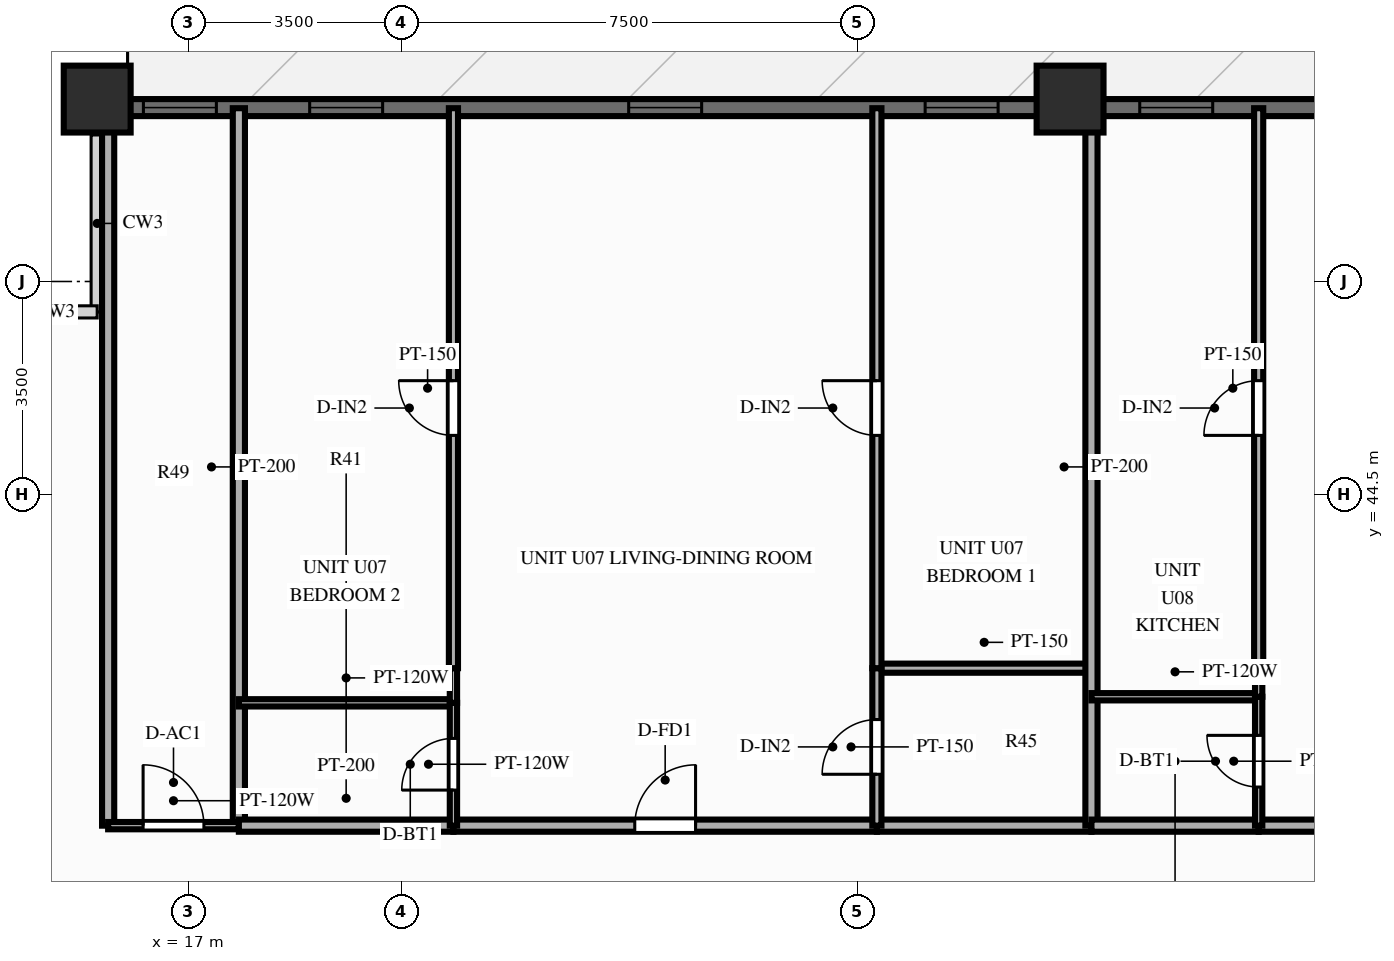
"""IFC4 building model, lengths in metres.
Left out: names, types, materials, properties, quantities, classifications, styles, units other than length and angle.
Written with IfcOpenShell. Run it as: python <this file> out.ifc"""

import sys

from ifc_helpers import new_model, si_unit, direction, frame, frame_2d, origin, origin_2d, place, context, subcontext, project, spatial, rectangle, extrude, source, transform, mapped, element, fill, save


model = new_model("IFC4")
c1 = context("Model", 3, precision=1e-05, world=origin(), true_north=direction((0.0, 1.0)))
c2 = subcontext(c1, "Body", "Model", "MODEL_VIEW")
j1 = project(units=[si_unit("LENGTHUNIT", "METRE"), si_unit("PLANEANGLEUNIT", "RADIAN")], contexts=[c1])
p1 = place(None, origin())
s1 = spatial("IfcSite", under=j1, at=p1, CompositionType="ELEMENT")
p2 = place(p1, origin())
s2 = spatial("IfcBuilding", under=s1, at=p2, CompositionType="ELEMENT")
p3 = place(p2, frame((0.0, 0.0, 25.4)))
s3 = spatial("IfcBuildingStorey", under=s2, at=p3, CompositionType="ELEMENT", Elevation=25.4)
m1 = source(origin(), c2, "Body", "SweptSolid", [
    extrude(rectangle(XDim=1.1, YDim=1.1, at=origin_2d()), origin(), (0.0, 0.0, 1.0), 3.0),
])
for number, where, z_axis, x_axis in (
    (1, (31.5, 51.0, 0.0), (0.0, 0.0, 1.0), (1.0, 0.0, 0.0)),
    (2, (15.5, 51.0, 0.0), (0.0, 0.0, 1.0), (1.0, 0.0, 0.0)),
):
    element("IfcColumn", number, at=place(p3, frame(where, z_axis=z_axis, x_axis=x_axis)), inside=s3, PredefinedType="COLUMN", context=c2, shape_type="MappedRepresentation", body=[
        mapped(m1, transform((0.0, 0.0, 0.0), scale=1.0)),
    ])
p4 = place(p3, frame((15.5, 50.86, 0.0), z_axis=(0.0, 0.0, 1.0), x_axis=(1.0, 0.0, 0.0)))
e3 = element("IfcWall", 3, at=p4, inside=s3, PredefinedType="SOLIDWALL", context=c2, shape_type="SweptSolid", body=[
    extrude(rectangle(XDim=45.0, YDim=0.28, at=frame_2d((22.5, 0.0))), origin(), (0.0, 0.0, 1.0), 2.28),
])
p5 = place(p4, frame((0.76, 0.0, 0.25)))
e4 = element("IfcOpeningElement", 4, at=p5, cuts=e3, PredefinedType="OPENING", context=c2, shape_type="SweptSolid", body=[
    extrude(rectangle(XDim=1.2, YDim=1.5, at=frame_2d((0.6, 0.75))), frame((0.0, 0.152, 0.0), z_axis=(0.0, -1.0, 0.0), x_axis=(1.0, 0.0, 0.0)), (0.0, 0.0, 1.0), 0.304),
])
p6 = place(p4, frame((3.494, 0.0, 0.25)))
e5 = element("IfcOpeningElement", 5, at=p6, cuts=e3, PredefinedType="OPENING", context=c2, shape_type="SweptSolid", body=[
    extrude(rectangle(XDim=1.2, YDim=1.5, at=frame_2d((0.6, 0.75))), frame((0.0, 0.152, 0.0), z_axis=(0.0, -1.0, 0.0), x_axis=(1.0, 0.0, 0.0)), (0.0, 0.0, 1.0), 0.304),
])
p7 = place(p4, frame((8.741, 0.0, 0.25)))
e6 = element("IfcOpeningElement", 6, at=p7, cuts=e3, PredefinedType="OPENING", context=c2, shape_type="SweptSolid", body=[
    extrude(rectangle(XDim=1.2, YDim=1.5, at=frame_2d((0.6, 0.75))), frame((0.0, 0.152, 0.0), z_axis=(0.0, -1.0, 0.0), x_axis=(1.0, 0.0, 0.0)), (0.0, 0.0, 1.0), 0.304),
])
p8 = place(p4, frame((13.616, 0.0, 0.25)))
e7 = element("IfcOpeningElement", 7, at=p8, cuts=e3, PredefinedType="OPENING", context=c2, shape_type="SweptSolid", body=[
    extrude(rectangle(XDim=1.2, YDim=1.5, at=frame_2d((0.6, 0.75))), frame((0.0, 0.152, 0.0), z_axis=(0.0, -1.0, 0.0), x_axis=(1.0, 0.0, 0.0)), (0.0, 0.0, 1.0), 0.304),
])
p9 = place(p4, frame((17.146, 0.0, 0.25)))
e8 = element("IfcOpeningElement", 8, at=p9, cuts=e3, PredefinedType="OPENING", context=c2, shape_type="SweptSolid", body=[
    extrude(rectangle(XDim=1.2, YDim=1.5, at=frame_2d((0.6, 0.75))), frame((0.0, 0.152, 0.0), z_axis=(0.0, -1.0, 0.0), x_axis=(1.0, 0.0, 0.0)), (0.0, 0.0, 1.0), 0.304),
])
p10 = place(p4, frame((22.423, 0.0, 0.0)))
e9 = element("IfcOpeningElement", 9, at=p10, cuts=e3, PredefinedType="OPENING", context=c2, shape_type="SweptSolid", body=[
    extrude(rectangle(XDim=1.1, YDim=2.15, at=frame_2d((0.55, 1.075))), frame((0.0, 0.152, 0.0), z_axis=(0.0, -1.0, 0.0), x_axis=(1.0, 0.0, 0.0)), (0.0, 0.0, 1.0), 0.304),
])
p11 = place(p4, frame((27.252, 0.0, 0.25)))
e10 = element("IfcOpeningElement", 10, at=p11, cuts=e3, PredefinedType="OPENING", context=c2, shape_type="SweptSolid", body=[
    extrude(rectangle(XDim=0.95, YDim=1.5, at=frame_2d((0.475, 0.75))), frame((0.0, 0.152, 0.0), z_axis=(0.0, -1.0, 0.0), x_axis=(1.0, 0.0, 0.0)), (0.0, 0.0, 1.0), 0.304),
])
p12 = place(p4, frame((30.873, 0.0, 0.25)))
e11 = element("IfcOpeningElement", 11, at=p12, cuts=e3, PredefinedType="OPENING", context=c2, shape_type="SweptSolid", body=[
    extrude(rectangle(XDim=1.2, YDim=1.5, at=frame_2d((0.6, 0.75))), frame((0.0, 0.152, 0.0), z_axis=(0.0, -1.0, 0.0), x_axis=(1.0, 0.0, 0.0)), (0.0, 0.0, 1.0), 0.304),
])
p13 = place(p4, frame((33.113, 0.0, 0.25)))
e12 = element("IfcOpeningElement", 12, at=p13, cuts=e3, PredefinedType="OPENING", context=c2, shape_type="SweptSolid", body=[
    extrude(rectangle(XDim=1.2, YDim=1.5, at=frame_2d((0.6, 0.75))), frame((0.0, 0.152, 0.0), z_axis=(0.0, -1.0, 0.0), x_axis=(1.0, 0.0, 0.0)), (0.0, 0.0, 1.0), 0.304),
])
p14 = place(p4, frame((35.624, 0.0, 0.25)))
e13 = element("IfcOpeningElement", 13, at=p14, cuts=e3, PredefinedType="OPENING", context=c2, shape_type="SweptSolid", body=[
    extrude(rectangle(XDim=1.2, YDim=1.5, at=frame_2d((0.6, 0.75))), frame((0.0, 0.152, 0.0), z_axis=(0.0, -1.0, 0.0), x_axis=(1.0, 0.0, 0.0)), (0.0, 0.0, 1.0), 0.304),
])
p15 = place(p4, frame((38.097, 0.0, 0.25)))
e14 = element("IfcOpeningElement", 14, at=p15, cuts=e3, PredefinedType="OPENING", context=c2, shape_type="SweptSolid", body=[
    extrude(rectangle(XDim=1.2, YDim=1.5, at=frame_2d((0.6, 0.75))), frame((0.0, 0.152, 0.0), z_axis=(0.0, -1.0, 0.0), x_axis=(1.0, 0.0, 0.0)), (0.0, 0.0, 1.0), 0.304),
])
p16 = place(p4, frame((40.336, 0.0, 0.25)))
e15 = element("IfcOpeningElement", 15, at=p16, cuts=e3, PredefinedType="OPENING", context=c2, shape_type="SweptSolid", body=[
    extrude(rectangle(XDim=1.2, YDim=1.5, at=frame_2d((0.6, 0.75))), frame((0.0, 0.152, 0.0), z_axis=(0.0, -1.0, 0.0), x_axis=(1.0, 0.0, 0.0)), (0.0, 0.0, 1.0), 0.304),
])
p17 = place(p4, frame((42.743, 0.0, 0.25)))
e16 = element("IfcOpeningElement", 16, at=p17, cuts=e3, PredefinedType="OPENING", context=c2, shape_type="SweptSolid", body=[
    extrude(rectangle(XDim=1.2, YDim=1.5, at=frame_2d((0.6, 0.75))), frame((0.0, 0.152, 0.0), z_axis=(0.0, -1.0, 0.0), x_axis=(1.0, 0.0, 0.0)), (0.0, 0.0, 1.0), 0.304),
])
for number, where, z_axis, x_axis in (
    (17, (15.68, 39.05, 0.0), (0.0, 0.0, 1.0), (0.0, 1.0, 0.0)),
    (18, (17.83, 39.05, 0.0), (0.0, 0.0, 1.0), (0.0, 1.0, 0.0)),
):
    element("IfcWall", number, at=place(p3, frame(where, z_axis=z_axis, x_axis=x_axis)), inside=s3, PredefinedType="PARTITIONING", context=c2, shape_type="SweptSolid", body=[
        extrude(rectangle(XDim=11.8, YDim=0.2, at=frame_2d((5.9, 0.0))), origin(), (0.0, 0.0, 1.0), 2.79),
    ])
p18 = place(p3, frame((15.68, 39.05, 0.0), z_axis=(0.0, 0.0, 1.0), x_axis=(1.0, 0.0, 0.0)))
e19 = element("IfcWall", 19, at=p18, inside=s3, PredefinedType="PARTITIONING", context=c2, shape_type="SweptSolid", body=[
    extrude(rectangle(XDim=2.15, YDim=0.12, at=frame_2d((1.075, 0.0))), origin(), (0.0, 0.0, 1.0), 2.79),
])
p19 = place(p18, frame((0.575, 0.0, 0.0)))
e20 = element("IfcOpeningElement", 20, at=p19, cuts=e19, PredefinedType="OPENING", context=c2, shape_type="SweptSolid", body=[
    extrude(rectangle(XDim=1.0, YDim=2.1, at=frame_2d((0.5, 1.05))), frame((0.0, 0.072, 0.0), z_axis=(0.0, -1.0, 0.0), x_axis=(1.0, 0.0, 0.0)), (0.0, 0.0, 1.0), 0.144),
])
p20 = place(p3, frame((17.83, 39.05, 0.0), z_axis=(0.0, 0.0, 1.0), x_axis=(1.0, 0.0, 0.0)))
e21 = element("IfcWall", 21, at=p20, inside=s3, PredefinedType="PARTITIONING", context=c2, shape_type="SweptSolid", body=[
    extrude(rectangle(XDim=3.529, YDim=0.2, at=frame_2d((1.764, 0.0))), origin(), (0.0, 0.0, 1.0), 2.79),
])
p21 = place(p3, frame((21.359, 39.05, 0.0), z_axis=(0.0, 0.0, 1.0), x_axis=(1.0, 0.0, 0.0)))
e22 = element("IfcWall", 22, at=p21, inside=s3, PredefinedType="PARTITIONING", context=c2, shape_type="SweptSolid", body=[
    extrude(rectangle(XDim=6.964, YDim=0.2, at=frame_2d((3.482, 0.0))), origin(), (0.0, 0.0, 1.0), 2.79),
])
p22 = place(p21, frame((2.982, 0.0, 0.0)))
e23 = element("IfcOpeningElement", 23, at=p22, cuts=e22, PredefinedType="OPENING", context=c2, shape_type="SweptSolid", body=[
    extrude(rectangle(XDim=1.0, YDim=2.15, at=frame_2d((0.5, 1.075))), frame((0.0, 0.112, 0.0), z_axis=(0.0, -1.0, 0.0), x_axis=(1.0, 0.0, 0.0)), (0.0, 0.0, 1.0), 0.224),
])
p23 = place(p3, frame((28.323, 39.05, 0.0), z_axis=(0.0, 0.0, 1.0), x_axis=(1.0, 0.0, 0.0)))
e24 = element("IfcWall", 24, at=p23, inside=s3, PredefinedType="PARTITIONING", context=c2, shape_type="SweptSolid", body=[
    extrude(rectangle(XDim=3.529, YDim=0.2, at=frame_2d((1.764, 0.0))), origin(), (0.0, 0.0, 1.0), 2.79),
])
p24 = place(p3, frame((17.83, 41.07, 0.0), z_axis=(0.0, 0.0, 1.0), x_axis=(1.0, 0.0, 0.0)))
e25 = element("IfcWall", 25, at=p24, inside=s3, PredefinedType="PARTITIONING", context=c2, shape_type="SweptSolid", body=[
    extrude(rectangle(XDim=3.529, YDim=0.12, at=frame_2d((1.764, 0.0))), origin(), (0.0, 0.0, 1.0), 2.79),
])
p25 = place(p3, frame((28.323, 41.64, 0.0), z_axis=(0.0, 0.0, 1.0), x_axis=(1.0, 0.0, 0.0)))
e26 = element("IfcWall", 26, at=p25, inside=s3, PredefinedType="PARTITIONING", context=c2, shape_type="SweptSolid", body=[
    extrude(rectangle(XDim=3.529, YDim=0.15, at=frame_2d((1.764, 0.0))), origin(), (0.0, 0.0, 1.0), 2.79),
])
p26 = place(p3, frame((21.359, 39.05, 0.0), z_axis=(0.0, 0.0, 1.0), x_axis=(0.0, 1.0, 0.0)))
e27 = element("IfcWall", 27, at=p26, inside=s3, PredefinedType="PARTITIONING", context=c2, shape_type="SweptSolid", body=[
    extrude(rectangle(XDim=2.02, YDim=0.12, at=frame_2d((1.01, 0.0))), origin(), (0.0, 0.0, 1.0), 2.79),
])
p27 = place(p26, frame((0.585, 0.0, 0.0)))
e28 = element("IfcOpeningElement", 28, at=p27, cuts=e27, PredefinedType="OPENING", context=c2, shape_type="SweptSolid", body=[
    extrude(rectangle(XDim=0.85, YDim=2.05, at=frame_2d((0.425, 1.025))), frame((0.0, 0.072, 0.0), z_axis=(0.0, -1.0, 0.0), x_axis=(1.0, 0.0, 0.0)), (0.0, 0.0, 1.0), 0.144),
])
p28 = place(p3, frame((21.359, 41.07, 0.0), z_axis=(0.0, 0.0, 1.0), x_axis=(0.0, 1.0, 0.0)))
e29 = element("IfcWall", 29, at=p28, inside=s3, PredefinedType="PARTITIONING", context=c2, shape_type="SweptSolid", body=[
    extrude(rectangle(XDim=0.57, YDim=0.12, at=frame_2d((0.285, 0.0))), origin(), (0.0, 0.0, 1.0), 2.79),
])
p29 = place(p3, frame((21.359, 41.64, 0.0), z_axis=(0.0, 0.0, 1.0), x_axis=(0.0, 1.0, 0.0)))
e30 = element("IfcWall", 30, at=p29, inside=s3, PredefinedType="PARTITIONING", context=c2, shape_type="SweptSolid", body=[
    extrude(rectangle(XDim=9.21, YDim=0.15, at=frame_2d((4.605, 0.0))), origin(), (0.0, 0.0, 1.0), 2.79),
])
p30 = place(p29, frame((3.829, 0.0, 0.0)))
e31 = element("IfcOpeningElement", 31, at=p30, cuts=e30, PredefinedType="OPENING", context=c2, shape_type="SweptSolid", body=[
    extrude(rectangle(XDim=0.9, YDim=2.1, at=frame_2d((0.45, 1.05))), frame((0.0, 0.087, 0.0), z_axis=(0.0, -1.0, 0.0), x_axis=(1.0, 0.0, 0.0)), (0.0, 0.0, 1.0), 0.174),
])
p31 = place(p3, frame((28.323, 39.05, 0.0), z_axis=(0.0, 0.0, 1.0), x_axis=(0.0, 1.0, 0.0)))
e32 = element("IfcWall", 32, at=p31, inside=s3, PredefinedType="PARTITIONING", context=c2, shape_type="SweptSolid", body=[
    extrude(rectangle(XDim=2.59, YDim=0.15, at=frame_2d((1.295, 0.0))), origin(), (0.0, 0.0, 1.0), 2.79),
])
p32 = place(p31, frame((0.845, 0.0, 0.0)))
e33 = element("IfcOpeningElement", 33, at=p32, cuts=e32, PredefinedType="OPENING", context=c2, shape_type="SweptSolid", body=[
    extrude(rectangle(XDim=0.9, YDim=2.1, at=frame_2d((0.45, 1.05))), frame((0.0, 0.087, 0.0), z_axis=(0.0, -1.0, 0.0), x_axis=(1.0, 0.0, 0.0)), (0.0, 0.0, 1.0), 0.174),
])
p33 = place(p3, frame((28.323, 41.64, 0.0), z_axis=(0.0, 0.0, 1.0), x_axis=(0.0, 1.0, 0.0)))
e34 = element("IfcWall", 34, at=p33, inside=s3, PredefinedType="PARTITIONING", context=c2, shape_type="SweptSolid", body=[
    extrude(rectangle(XDim=9.21, YDim=0.15, at=frame_2d((4.605, 0.0))), origin(), (0.0, 0.0, 1.0), 2.79),
])
p34 = place(p33, frame((3.829, 0.0, 0.0)))
e35 = element("IfcOpeningElement", 35, at=p34, cuts=e34, PredefinedType="OPENING", context=c2, shape_type="SweptSolid", body=[
    extrude(rectangle(XDim=0.9, YDim=2.1, at=frame_2d((0.45, 1.05))), frame((0.0, 0.087, 0.0), z_axis=(0.0, -1.0, 0.0), x_axis=(1.0, 0.0, 0.0)), (0.0, 0.0, 1.0), 0.174),
])
p35 = place(p3, frame((31.852, 39.05, 0.0), z_axis=(0.0, 0.0, 1.0), x_axis=(0.0, 1.0, 0.0)))
e36 = element("IfcWall", 36, at=p35, inside=s3, PredefinedType="PARTITIONING", context=c2, shape_type="SweptSolid", body=[
    extrude(rectangle(XDim=11.8, YDim=0.2, at=frame_2d((5.9, 0.0))), origin(), (0.0, 0.0, 1.0), 2.79),
])
p36 = place(p3, frame((31.852, 39.05, 0.0), z_axis=(0.0, 0.0, 1.0), x_axis=(1.0, 0.0, 0.0)))
e37 = element("IfcWall", 37, at=p36, inside=s3, PredefinedType="PARTITIONING", context=c2, shape_type="SweptSolid", body=[
    extrude(rectangle(XDim=2.75, YDim=0.2, at=frame_2d((1.375, 0.0))), origin(), (0.0, 0.0, 1.0), 2.79),
])
p37 = place(p3, frame((34.602, 39.05, 0.0), z_axis=(0.0, 0.0, 1.0), x_axis=(1.0, 0.0, 0.0)))
e38 = element("IfcWall", 38, at=p37, inside=s3, PredefinedType="PARTITIONING", context=c2, shape_type="SweptSolid", body=[
    extrude(rectangle(XDim=7.743, YDim=0.2, at=frame_2d((3.871, 0.0))), origin(), (0.0, 0.0, 1.0), 2.79),
])
p38 = place(p37, frame((3.371, 0.0, 0.0)))
e39 = element("IfcOpeningElement", 39, at=p38, cuts=e38, PredefinedType="OPENING", context=c2, shape_type="SweptSolid", body=[
    extrude(rectangle(XDim=1.0, YDim=2.15, at=frame_2d((0.5, 1.075))), frame((0.0, 0.112, 0.0), z_axis=(0.0, -1.0, 0.0), x_axis=(1.0, 0.0, 0.0)), (0.0, 0.0, 1.0), 0.224),
])
p39 = place(p3, frame((31.852, 41.17, 0.0), z_axis=(0.0, 0.0, 1.0), x_axis=(1.0, 0.0, 0.0)))
e40 = element("IfcWall", 40, at=p39, inside=s3, PredefinedType="PARTITIONING", context=c2, shape_type="SweptSolid", body=[
    extrude(rectangle(XDim=2.75, YDim=0.12, at=frame_2d((1.375, 0.0))), origin(), (0.0, 0.0, 1.0), 2.79),
])
p40 = place(p3, frame((34.602, 39.05, 0.0), z_axis=(0.0, 0.0, 1.0), x_axis=(0.0, 1.0, 0.0)))
e41 = element("IfcWall", 41, at=p40, inside=s3, PredefinedType="PARTITIONING", context=c2, shape_type="SweptSolid", body=[
    extrude(rectangle(XDim=2.12, YDim=0.12, at=frame_2d((1.06, 0.0))), origin(), (0.0, 0.0, 1.0), 2.79),
])
p41 = place(p40, frame((0.635, 0.0, 0.0)))
e42 = element("IfcOpeningElement", 42, at=p41, cuts=e41, PredefinedType="OPENING", context=c2, shape_type="SweptSolid", body=[
    extrude(rectangle(XDim=0.85, YDim=2.05, at=frame_2d((0.425, 1.025))), frame((0.0, 0.072, 0.0), z_axis=(0.0, -1.0, 0.0), x_axis=(1.0, 0.0, 0.0)), (0.0, 0.0, 1.0), 0.144),
])
p42 = place(p3, frame((34.602, 41.17, 0.0), z_axis=(0.0, 0.0, 1.0), x_axis=(0.0, 1.0, 0.0)))
e43 = element("IfcWall", 43, at=p42, inside=s3, PredefinedType="PARTITIONING", context=c2, shape_type="SweptSolid", body=[
    extrude(rectangle(XDim=0.47, YDim=0.12, at=frame_2d((0.235, 0.0))), origin(), (0.0, 0.0, 1.0), 2.79),
])
p43 = place(p3, frame((34.602, 41.64, 0.0), z_axis=(0.0, 0.0, 1.0), x_axis=(0.0, 1.0, 0.0)))
e44 = element("IfcWall", 44, at=p43, inside=s3, PredefinedType="PARTITIONING", context=c2, shape_type="SweptSolid", body=[
    extrude(rectangle(XDim=9.21, YDim=0.15, at=frame_2d((4.605, 0.0))), origin(), (0.0, 0.0, 1.0), 2.79),
])
p44 = place(p43, frame((3.829, 0.0, 0.0)))
e45 = element("IfcOpeningElement", 45, at=p44, cuts=e44, PredefinedType="OPENING", context=c2, shape_type="SweptSolid", body=[
    extrude(rectangle(XDim=0.9, YDim=2.1, at=frame_2d((0.45, 1.05))), frame((0.0, 0.087, 0.0), z_axis=(0.0, -1.0, 0.0), x_axis=(1.0, 0.0, 0.0)), (0.0, 0.0, 1.0), 0.174),
])
m2 = source(origin(), c2, "Body", "SweptSolid", [
    extrude(rectangle(XDim=1.2, YDim=1.5, at=frame_2d((0.6, 0.75))), frame((0.0, 0.03, 0.0), z_axis=(0.0, -1.0, 0.0), x_axis=(1.0, 0.0, 0.0)), (0.0, 0.0, 1.0), 0.06),
])
p45 = place(p5, origin())
e46 = element("IfcWindow", 46, at=p45, inside=s3, PartitioningType="SINGLE_PANEL", PredefinedType="WINDOW", context=c2, shape_type="MappedRepresentation", body=[
    mapped(m2, transform((0.0, 0.0, 0.0), scale=1.0)),
])
fill(e4, e46)
p46 = place(p6, origin())
e47 = element("IfcWindow", 47, at=p46, inside=s3, PartitioningType="SINGLE_PANEL", PredefinedType="WINDOW", context=c2, shape_type="MappedRepresentation", body=[
    mapped(m2, transform((0.0, 0.0, 0.0), scale=1.0)),
])
fill(e5, e47)
p47 = place(p7, origin())
e48 = element("IfcWindow", 48, at=p47, inside=s3, PartitioningType="SINGLE_PANEL", PredefinedType="WINDOW", context=c2, shape_type="MappedRepresentation", body=[
    mapped(m2, transform((0.0, 0.0, 0.0), scale=1.0)),
])
fill(e6, e48)
p48 = place(p8, origin())
e49 = element("IfcWindow", 49, at=p48, inside=s3, PartitioningType="SINGLE_PANEL", PredefinedType="WINDOW", context=c2, shape_type="MappedRepresentation", body=[
    mapped(m2, transform((0.0, 0.0, 0.0), scale=1.0)),
])
fill(e7, e49)
p49 = place(p9, origin())
e50 = element("IfcWindow", 50, at=p49, inside=s3, PartitioningType="SINGLE_PANEL", PredefinedType="WINDOW", context=c2, shape_type="MappedRepresentation", body=[
    mapped(m2, transform((0.0, 0.0, 0.0), scale=1.0)),
])
fill(e8, e50)
m3 = source(origin(), c2, "Body", "SweptSolid", [
    extrude(rectangle(XDim=1.0, YDim=2.1, at=frame_2d((0.5, 1.05))), frame((0.0, 0.025, 0.0), z_axis=(0.0, -1.0, 0.0), x_axis=(1.0, 0.0, 0.0)), (0.0, 0.0, 1.0), 0.05),
])
p50 = place(p19, origin())
e51 = element("IfcDoor", 51, at=p50, inside=s3, OperationType="SINGLE_SWING_LEFT", PredefinedType="DOOR", context=c2, shape_type="MappedRepresentation", body=[
    mapped(m3, transform((0.0, 0.0, 0.0), scale=1.0)),
])
fill(e20, e51)
m4 = source(origin(), c2, "Body", "SweptSolid", [
    extrude(rectangle(XDim=1.0, YDim=2.15, at=frame_2d((0.5, 1.075))), frame((0.0, 0.025, 0.0), z_axis=(0.0, -1.0, 0.0), x_axis=(1.0, 0.0, 0.0)), (0.0, 0.0, 1.0), 0.05),
])
p51 = place(p22, origin())
e52 = element("IfcDoor", 52, at=p51, inside=s3, OperationType="SINGLE_SWING_RIGHT", PredefinedType="DOOR", context=c2, shape_type="MappedRepresentation", body=[
    mapped(m4, transform((0.0, 0.0, 0.0), scale=1.0)),
])
fill(e23, e52)
m5 = source(origin(), c2, "Body", "SweptSolid", [
    extrude(rectangle(XDim=0.85, YDim=2.05, at=frame_2d((0.425, 1.025))), frame((0.0, 0.025, 0.0), z_axis=(0.0, -1.0, 0.0), x_axis=(1.0, 0.0, 0.0)), (0.0, 0.0, 1.0), 0.05),
])
p52 = place(p27, origin())
e53 = element("IfcDoor", 53, at=p52, inside=s3, OperationType="SINGLE_SWING_LEFT", PredefinedType="DOOR", context=c2, shape_type="MappedRepresentation", body=[
    mapped(m5, transform((0.0, 0.0, 0.0), scale=1.0)),
])
fill(e28, e53)
m6 = source(origin(), c2, "Body", "SweptSolid", [
    extrude(rectangle(XDim=0.9, YDim=2.1, at=frame_2d((0.45, 1.05))), frame((0.0, 0.025, 0.0), z_axis=(0.0, -1.0, 0.0), x_axis=(1.0, 0.0, 0.0)), (0.0, 0.0, 1.0), 0.05),
])
p53 = place(p30, origin())
e54 = element("IfcDoor", 54, at=p53, inside=s3, OperationType="SINGLE_SWING_RIGHT", PredefinedType="DOOR", context=c2, shape_type="MappedRepresentation", body=[
    mapped(m6, transform((0.0, 0.0, 0.0), scale=1.0)),
])
fill(e31, e54)
p54 = place(p32, origin())
e55 = element("IfcDoor", 55, at=p54, inside=s3, OperationType="SINGLE_SWING_LEFT", PredefinedType="DOOR", context=c2, shape_type="MappedRepresentation", body=[
    mapped(m6, transform((0.0, 0.0, 0.0), scale=1.0)),
])
fill(e33, e55)
p55 = place(p34, origin())
e56 = element("IfcDoor", 56, at=p55, inside=s3, OperationType="SINGLE_SWING_RIGHT", PredefinedType="DOOR", context=c2, shape_type="MappedRepresentation", body=[
    mapped(m6, transform((0.0, 0.0, 0.0), scale=1.0)),
])
fill(e35, e56)
p56 = place(p41, origin())
e57 = element("IfcDoor", 57, at=p56, inside=s3, OperationType="SINGLE_SWING_RIGHT", PredefinedType="DOOR", context=c2, shape_type="MappedRepresentation", body=[
    mapped(m5, transform((0.0, 0.0, 0.0), scale=1.0)),
])
fill(e42, e57)
p57 = place(p44, origin())
e58 = element("IfcDoor", 58, at=p57, inside=s3, OperationType="SINGLE_SWING_LEFT", PredefinedType="DOOR", context=c2, shape_type="MappedRepresentation", body=[
    mapped(m6, transform((0.0, 0.0, 0.0), scale=1.0)),
])
fill(e45, e58)
save(model, sys.argv[1])
